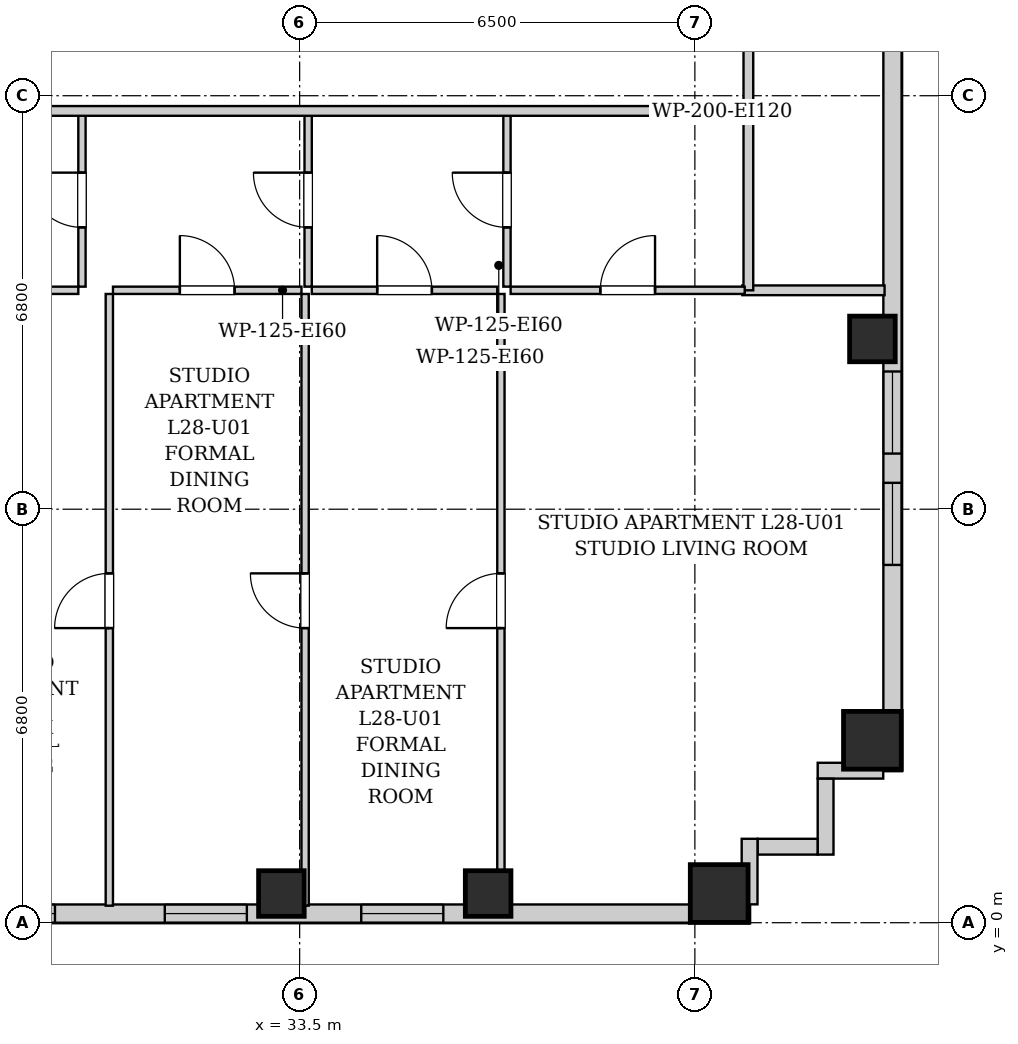
"""IFC4 building model, lengths in metres.
Left out: names, types, materials, properties, quantities, classifications, styles, units other than length and angle.
Written with IfcOpenShell. Run it as: python <this file> out.ifc"""

import sys

from ifc_helpers import new_model, si_unit, direction, frame, frame_2d, origin, origin_2d, place, context, subcontext, project, spatial, rectangle, extrude, element, fill, save


model = new_model("IFC4")
c1 = context("Model", 3, precision=1e-05, world=origin(), true_north=direction((0.0, 1.0)))
c2 = subcontext(c1, "Body", "Model", "MODEL_VIEW")
j1 = project(units=[si_unit("LENGTHUNIT", "METRE"), si_unit("PLANEANGLEUNIT", "RADIAN")], contexts=[c1])
p1 = place(None, origin())
s1 = spatial("IfcSite", under=j1, at=p1, CompositionType="ELEMENT")
p2 = place(p1, origin())
s2 = spatial("IfcBuilding", under=s1, at=p2, CompositionType="ELEMENT")
p3 = place(p2, frame((0.0, 0.0, 100.7)))
s3 = spatial("IfcBuildingStorey", under=s2, at=p3, CompositionType="ELEMENT", Elevation=100.7)
for number, where, z_axis, x_axis in (
    (1, (33.2, 0.48, 0.0), (0.0, 0.0, 1.0), (1.0, 0.0, 0.0)),
    (2, (36.6, 0.48, 0.0), (0.0, 0.0, 1.0), (1.0, 0.0, 0.0)),
):
    element("IfcColumn", number, at=place(p3, frame(where, z_axis=z_axis, x_axis=x_axis)), inside=s3, PredefinedType="COLUMN", context=c2, shape_type="SweptSolid", body=[
        extrude(rectangle(XDim=0.75, YDim=0.75, at=origin_2d()), origin(), (0.0, 0.0, 1.0), 3.2),
    ])
for number, where, z_axis, x_axis in (
    (3, (40.4, 0.48, 0.0), (0.0, 0.0, 1.0), (1.0, 0.0, 0.0)),
    (4, (42.92, 3.0, 0.0), (0.0, 0.0, 1.0), (1.0, 0.0, 0.0)),
):
    element("IfcColumn", number, at=place(p3, frame(where, z_axis=z_axis, x_axis=x_axis)), inside=s3, PredefinedType="COLUMN", context=c2, shape_type="SweptSolid", body=[
        extrude(rectangle(XDim=0.95, YDim=0.95, at=origin_2d()), origin(), (0.0, 0.0, 1.0), 3.2),
    ])
p4 = place(p3, frame((42.92, 9.6, 0.0), z_axis=(0.0, 0.0, 1.0), x_axis=(1.0, 0.0, 0.0)))
e5 = element("IfcColumn", 5, at=p4, inside=s3, PredefinedType="COLUMN", context=c2, shape_type="SweptSolid", body=[
    extrude(rectangle(XDim=0.75, YDim=0.75, at=origin_2d()), origin(), (0.0, 0.0, 1.0), 3.2),
])
p5 = place(p3, frame((43.25, 24.6, 0.0), z_axis=(0.0, 0.0, 1.0), x_axis=(0.0, -1.0, 0.0)))
e6 = element("IfcWall", 6, at=p5, inside=s3, PredefinedType="SOLIDWALL", context=c2, shape_type="SweptSolid", body=[
    extrude(rectangle(XDim=22.1, YDim=0.3, at=frame_2d((11.05, 0.0))), origin(), (0.0, 0.0, 1.0), 2.94),
])
p6 = place(p5, frame((17.366, 0.0, 0.55)))
e7 = element("IfcOpeningElement", 7, at=p6, cuts=e6, PredefinedType="OPENING", context=c2, shape_type="SweptSolid", body=[
    extrude(rectangle(XDim=1.35, YDim=1.2, at=frame_2d((0.675, 0.6))), frame((0.0, 0.16, 0.0), z_axis=(0.0, -1.0, 0.0), x_axis=(1.0, 0.0, 0.0)), (0.0, 0.0, 1.0), 0.32),
])
p7 = place(p5, frame((15.535, 0.0, 0.55)))
e8 = element("IfcOpeningElement", 8, at=p7, cuts=e6, PredefinedType="OPENING", context=c2, shape_type="SweptSolid", body=[
    extrude(rectangle(XDim=1.35, YDim=1.2, at=frame_2d((0.675, 0.6))), frame((0.0, 0.16, 0.0), z_axis=(0.0, -1.0, 0.0), x_axis=(1.0, 0.0, 0.0)), (0.0, 0.0, 1.0), 0.32),
])
p8 = place(p3, frame((40.9, 0.15, 0.0), z_axis=(0.0, 0.0, 1.0), x_axis=(-1.0, 0.0, 0.0)))
e9 = element("IfcWall", 9, at=p8, inside=s3, PredefinedType="SOLIDWALL", context=c2, shape_type="SweptSolid", body=[
    extrude(rectangle(XDim=24.35, YDim=0.3, at=frame_2d((12.175, 0.0))), origin(), (0.0, 0.0, 1.0), 2.94),
])
p9 = place(p8, frame((21.119, 0.0, 0.55)))
e10 = element("IfcOpeningElement", 10, at=p9, cuts=e9, PredefinedType="OPENING", context=c2, shape_type="SweptSolid", body=[
    extrude(rectangle(XDim=1.35, YDim=1.2, at=frame_2d((0.675, 0.6))), frame((0.0, 0.16, 0.0), z_axis=(0.0, -1.0, 0.0), x_axis=(1.0, 0.0, 0.0)), (0.0, 0.0, 1.0), 0.32),
])
p10 = place(p8, frame((18.4, 0.0, 0.55)))
e11 = element("IfcOpeningElement", 11, at=p10, cuts=e9, PredefinedType="OPENING", context=c2, shape_type="SweptSolid", body=[
    extrude(rectangle(XDim=1.35, YDim=1.2, at=frame_2d((0.675, 0.6))), frame((0.0, 0.16, 0.0), z_axis=(0.0, -1.0, 0.0), x_axis=(1.0, 0.0, 0.0)), (0.0, 0.0, 1.0), 0.32),
])
p11 = place(p8, frame((11.424, 0.0, 0.55)))
e12 = element("IfcOpeningElement", 12, at=p11, cuts=e9, PredefinedType="OPENING", context=c2, shape_type="SweptSolid", body=[
    extrude(rectangle(XDim=1.35, YDim=1.2, at=frame_2d((0.675, 0.6))), frame((0.0, 0.16, 0.0), z_axis=(0.0, -1.0, 0.0), x_axis=(1.0, 0.0, 0.0)), (0.0, 0.0, 1.0), 0.32),
])
p12 = place(p8, frame((8.268, 0.0, 0.55)))
e13 = element("IfcOpeningElement", 13, at=p12, cuts=e9, PredefinedType="OPENING", context=c2, shape_type="SweptSolid", body=[
    extrude(rectangle(XDim=1.35, YDim=1.2, at=frame_2d((0.675, 0.6))), frame((0.0, 0.16, 0.0), z_axis=(0.0, -1.0, 0.0), x_axis=(1.0, 0.0, 0.0)), (0.0, 0.0, 1.0), 0.32),
])
p13 = place(p8, frame((5.037, 0.0, 0.55)))
e14 = element("IfcOpeningElement", 14, at=p13, cuts=e9, PredefinedType="OPENING", context=c2, shape_type="SweptSolid", body=[
    extrude(rectangle(XDim=1.35, YDim=1.2, at=frame_2d((0.675, 0.6))), frame((0.0, 0.16, 0.0), z_axis=(0.0, -1.0, 0.0), x_axis=(1.0, 0.0, 0.0)), (0.0, 0.0, 1.0), 0.32),
])
p14 = place(p3, frame((43.098, 2.5, 0.0), z_axis=(0.0, 0.0, 1.0), x_axis=(-1.0, 0.0, 0.0)))
e15 = element("IfcWall", 15, at=p14, inside=s3, PredefinedType="SOLIDWALL", context=c2, shape_type="SweptSolid", body=[
    extrude(rectangle(XDim=1.078, YDim=0.26, at=frame_2d((0.539, 0.0))), origin(), (0.0, 0.0, 1.0), 2.94),
])
p15 = place(p3, frame((42.15, 2.368, 0.0), z_axis=(0.0, 0.0, 1.0), x_axis=(0.0, -1.0, 0.0)))
e16 = element("IfcWall", 16, at=p15, inside=s3, PredefinedType="SOLIDWALL", context=c2, shape_type="SweptSolid", body=[
    extrude(rectangle(XDim=1.248, YDim=0.26, at=frame_2d((0.624, 0.0))), origin(), (0.0, 0.0, 1.0), 2.94),
])
p16 = place(p3, frame((42.018, 1.25, 0.0), z_axis=(0.0, 0.0, 1.0), x_axis=(-1.0, 0.0, 0.0)))
e17 = element("IfcWall", 17, at=p16, inside=s3, PredefinedType="SOLIDWALL", context=c2, shape_type="SweptSolid", body=[
    extrude(rectangle(XDim=0.986, YDim=0.26, at=frame_2d((0.493, 0.0))), origin(), (0.0, 0.0, 1.0), 2.94),
])
p17 = place(p3, frame((40.9, 1.38, 0.0), z_axis=(0.0, 0.0, 1.0), x_axis=(0.0, -1.0, 0.0)))
e18 = element("IfcWall", 18, at=p17, inside=s3, PredefinedType="SOLIDWALL", context=c2, shape_type="SweptSolid", body=[
    extrude(rectangle(XDim=1.078, YDim=0.26, at=frame_2d((0.539, 0.0))), origin(), (0.0, 0.0, 1.0), 2.94),
])
p18 = place(p3, frame((40.88, 13.35, 0.0), z_axis=(0.0, 0.0, 1.0), x_axis=(0.0, 1.0, 0.0)))
e19 = element("IfcWall", 19, at=p18, inside=s3, PredefinedType="PARTITIONING", context=c2, shape_type="SweptSolid", body=[
    extrude(rectangle(XDim=1.74, YDim=0.16, at=frame_2d((0.87, 0.0))), origin(), (0.0, 0.0, 1.0), 2.94),
])
p19 = place(p3, frame((40.78, 10.4, 0.0), z_axis=(0.0, 0.0, 1.0), x_axis=(1.0, 0.0, 0.0)))
e20 = element("IfcWall", 20, at=p19, inside=s3, PredefinedType="PARTITIONING", context=c2, shape_type="SweptSolid", body=[
    extrude(rectangle(XDim=2.34, YDim=0.16, at=frame_2d((1.17, 0.0))), origin(), (0.0, 0.0, 1.0), 2.94),
])
p20 = place(p3, frame((40.88, 10.4, 0.0), z_axis=(0.0, 0.0, 1.0), x_axis=(0.0, 1.0, 0.0)))
e21 = element("IfcWall", 21, at=p20, inside=s3, PredefinedType="PARTITIONING", context=c2, shape_type="SweptSolid", body=[
    extrude(rectangle(XDim=2.91, YDim=0.16, at=frame_2d((1.455, 0.0))), origin(), (0.0, 0.0, 1.0), 2.94),
])
p21 = place(p3, frame((29.92, 10.46, 0.0), z_axis=(0.0, 0.0, 1.0), x_axis=(0.0, 1.0, 0.0)))
e22 = element("IfcWall", 22, at=p21, inside=s3, PredefinedType="PARTITIONING", context=c2, shape_type="SweptSolid", body=[
    extrude(rectangle(XDim=2.85, YDim=0.12, at=frame_2d((1.425, 0.0))), origin(), (0.0, 0.0, 1.0), 2.94),
])
p22 = place(p21, frame((0.975, 0.0, 0.0)))
e23 = element("IfcOpeningElement", 23, at=p22, cuts=e22, PredefinedType="OPENING", context=c2, shape_type="SweptSolid", body=[
    extrude(rectangle(XDim=0.9, YDim=2.05, at=frame_2d((0.45, 1.025))), frame((0.0, 0.07, 0.0), z_axis=(0.0, -1.0, 0.0), x_axis=(1.0, 0.0, 0.0)), (0.0, 0.0, 1.0), 0.14),
])
p23 = place(p3, frame((27.21, 10.4, 0.0), z_axis=(0.0, 0.0, 1.0), x_axis=(1.0, 0.0, 0.0)))
e24 = element("IfcWall", 24, at=p23, inside=s3, PredefinedType="PARTITIONING", context=c2, shape_type="SweptSolid", body=[
    extrude(rectangle(XDim=2.65, YDim=0.12, at=frame_2d((1.325, 0.0))), origin(), (0.0, 0.0, 1.0), 2.94),
])
p24 = place(p23, frame((0.875, 0.0, 0.0)))
e25 = element("IfcOpeningElement", 25, at=p24, cuts=e24, PredefinedType="OPENING", context=c2, shape_type="SweptSolid", body=[
    extrude(rectangle(XDim=0.9, YDim=2.05, at=frame_2d((0.45, 1.025))), frame((0.0, 0.07, 0.0), z_axis=(0.0, -1.0, 0.0), x_axis=(1.0, 0.0, 0.0)), (0.0, 0.0, 1.0), 0.14),
])
p25 = place(p3, frame((33.64, 10.46, 0.0), z_axis=(0.0, 0.0, 1.0), x_axis=(0.0, 1.0, 0.0)))
e26 = element("IfcWall", 26, at=p25, inside=s3, PredefinedType="PARTITIONING", context=c2, shape_type="SweptSolid", body=[
    extrude(rectangle(XDim=2.85, YDim=0.12, at=frame_2d((1.425, 0.0))), origin(), (0.0, 0.0, 1.0), 2.94),
])
p26 = place(p25, frame((0.975, 0.0, 0.0)))
e27 = element("IfcOpeningElement", 27, at=p26, cuts=e26, PredefinedType="OPENING", context=c2, shape_type="SweptSolid", body=[
    extrude(rectangle(XDim=0.9, YDim=2.05, at=frame_2d((0.45, 1.025))), frame((0.0, 0.07, 0.0), z_axis=(0.0, -1.0, 0.0), x_axis=(1.0, 0.0, 0.0)), (0.0, 0.0, 1.0), 0.14),
])
p27 = place(p3, frame((30.43, 10.4, 0.0), z_axis=(0.0, 0.0, 1.0), x_axis=(1.0, 0.0, 0.0)))
e28 = element("IfcWall", 28, at=p27, inside=s3, PredefinedType="PARTITIONING", context=c2, shape_type="SweptSolid", body=[
    extrude(rectangle(XDim=3.1, YDim=0.12, at=frame_2d((1.55, 0.0))), origin(), (0.0, 0.0, 1.0), 2.94),
])
p28 = place(p27, frame((1.1, 0.0, 0.0)))
e29 = element("IfcOpeningElement", 29, at=p28, cuts=e28, PredefinedType="OPENING", context=c2, shape_type="SweptSolid", body=[
    extrude(rectangle(XDim=0.9, YDim=2.05, at=frame_2d((0.45, 1.025))), frame((0.0, 0.07, 0.0), z_axis=(0.0, -1.0, 0.0), x_axis=(1.0, 0.0, 0.0)), (0.0, 0.0, 1.0), 0.14),
])
p29 = place(p3, frame((36.91, 10.46, 0.0), z_axis=(0.0, 0.0, 1.0), x_axis=(0.0, 1.0, 0.0)))
e30 = element("IfcWall", 30, at=p29, inside=s3, PredefinedType="PARTITIONING", context=c2, shape_type="SweptSolid", body=[
    extrude(rectangle(XDim=2.85, YDim=0.12, at=frame_2d((1.425, 0.0))), origin(), (0.0, 0.0, 1.0), 2.94),
])
p30 = place(p29, frame((0.975, 0.0, 0.0)))
e31 = element("IfcOpeningElement", 31, at=p30, cuts=e30, PredefinedType="OPENING", context=c2, shape_type="SweptSolid", body=[
    extrude(rectangle(XDim=0.9, YDim=2.05, at=frame_2d((0.45, 1.025))), frame((0.0, 0.07, 0.0), z_axis=(0.0, -1.0, 0.0), x_axis=(1.0, 0.0, 0.0)), (0.0, 0.0, 1.0), 0.14),
])
p31 = place(p3, frame((33.7, 10.4, 0.0), z_axis=(0.0, 0.0, 1.0), x_axis=(1.0, 0.0, 0.0)))
e32 = element("IfcWall", 32, at=p31, inside=s3, PredefinedType="PARTITIONING", context=c2, shape_type="SweptSolid", body=[
    extrude(rectangle(XDim=3.05, YDim=0.12, at=frame_2d((1.525, 0.0))), origin(), (0.0, 0.0, 1.0), 2.94),
])
p32 = place(p31, frame((1.075, 0.0, 0.0)))
e33 = element("IfcOpeningElement", 33, at=p32, cuts=e32, PredefinedType="OPENING", context=c2, shape_type="SweptSolid", body=[
    extrude(rectangle(XDim=0.9, YDim=2.05, at=frame_2d((0.45, 1.025))), frame((0.0, 0.07, 0.0), z_axis=(0.0, -1.0, 0.0), x_axis=(1.0, 0.0, 0.0)), (0.0, 0.0, 1.0), 0.14),
])
p33 = place(p3, frame((36.97, 10.4, 0.0), z_axis=(0.0, 0.0, 1.0), x_axis=(1.0, 0.0, 0.0)))
e34 = element("IfcWall", 34, at=p33, inside=s3, PredefinedType="PARTITIONING", context=c2, shape_type="SweptSolid", body=[
    extrude(rectangle(XDim=3.85, YDim=0.12, at=frame_2d((1.925, 0.0))), origin(), (0.0, 0.0, 1.0), 2.94),
])
p34 = place(p33, frame((1.475, 0.0, 0.0)))
e35 = element("IfcOpeningElement", 35, at=p34, cuts=e34, PredefinedType="OPENING", context=c2, shape_type="SweptSolid", body=[
    extrude(rectangle(XDim=0.9, YDim=2.05, at=frame_2d((0.45, 1.025))), frame((0.0, 0.07, 0.0), z_axis=(0.0, -1.0, 0.0), x_axis=(1.0, 0.0, 0.0)), (0.0, 0.0, 1.0), 0.14),
])
p35 = place(p3, frame((30.37, 0.28, 0.0), z_axis=(0.0, 0.0, 1.0), x_axis=(0.0, 1.0, 0.0)))
e36 = element("IfcWall", 36, at=p35, inside=s3, PredefinedType="PARTITIONING", context=c2, shape_type="SweptSolid", body=[
    extrude(rectangle(XDim=10.06, YDim=0.12, at=frame_2d((5.03, 0.0))), origin(), (0.0, 0.0, 1.0), 2.94),
])
p36 = place(p35, frame((4.565, 0.0, 0.0)))
e37 = element("IfcOpeningElement", 37, at=p36, cuts=e36, PredefinedType="OPENING", context=c2, shape_type="SweptSolid", body=[
    extrude(rectangle(XDim=0.9, YDim=2.05, at=frame_2d((0.45, 1.025))), frame((0.0, 0.07, 0.0), z_axis=(0.0, -1.0, 0.0), x_axis=(1.0, 0.0, 0.0)), (0.0, 0.0, 1.0), 0.14),
])
p37 = place(p3, frame((33.59, 0.28, 0.0), z_axis=(0.0, 0.0, 1.0), x_axis=(0.0, 1.0, 0.0)))
e38 = element("IfcWall", 38, at=p37, inside=s3, PredefinedType="PARTITIONING", context=c2, shape_type="SweptSolid", body=[
    extrude(rectangle(XDim=10.06, YDim=0.12, at=frame_2d((5.03, 0.0))), origin(), (0.0, 0.0, 1.0), 2.94),
])
p38 = place(p37, frame((4.565, 0.0, 0.0)))
e39 = element("IfcOpeningElement", 39, at=p38, cuts=e38, PredefinedType="OPENING", context=c2, shape_type="SweptSolid", body=[
    extrude(rectangle(XDim=0.9, YDim=2.05, at=frame_2d((0.45, 1.025))), frame((0.0, 0.07, 0.0), z_axis=(0.0, -1.0, 0.0), x_axis=(1.0, 0.0, 0.0)), (0.0, 0.0, 1.0), 0.14),
])
p39 = place(p3, frame((36.81, 0.28, 0.0), z_axis=(0.0, 0.0, 1.0), x_axis=(0.0, 1.0, 0.0)))
e40 = element("IfcWall", 40, at=p39, inside=s3, PredefinedType="PARTITIONING", context=c2, shape_type="SweptSolid", body=[
    extrude(rectangle(XDim=10.06, YDim=0.12, at=frame_2d((5.03, 0.0))), origin(), (0.0, 0.0, 1.0), 2.94),
])
p40 = place(p39, frame((4.565, 0.0, 0.0)))
e41 = element("IfcOpeningElement", 41, at=p40, cuts=e40, PredefinedType="OPENING", context=c2, shape_type="SweptSolid", body=[
    extrude(rectangle(XDim=0.9, YDim=2.05, at=frame_2d((0.45, 1.025))), frame((0.0, 0.07, 0.0), z_axis=(0.0, -1.0, 0.0), x_axis=(1.0, 0.0, 0.0)), (0.0, 0.0, 1.0), 0.14),
])
p41 = place(p3, frame((10.05, 13.35, 0.0), z_axis=(0.0, 0.0, 1.0), x_axis=(1.0, 0.0, 0.0)))
e42 = element("IfcWall", 42, at=p41, inside=s3, PredefinedType="PARTITIONING", context=c2, shape_type="SweptSolid", body=[
    extrude(rectangle(XDim=30.8, YDim=0.16, at=frame_2d((15.4, 0.0))), origin(), (0.0, 0.0, 1.0), 2.94),
])
p42 = place(p41, frame((4.165, 0.0, 0.0)))
e43 = element("IfcOpeningElement", 43, at=p42, cuts=e42, PredefinedType="OPENING", context=c2, shape_type="SweptSolid", body=[
    extrude(rectangle(XDim=0.95, YDim=2.1, at=frame_2d((0.475, 1.05))), frame((0.0, 0.09, 0.0), z_axis=(0.0, -1.0, 0.0), x_axis=(1.0, 0.0, 0.0)), (0.0, 0.0, 1.0), 0.18),
])
p43 = place(p22, origin())
e44 = element("IfcDoor", 44, at=p43, inside=s3, OperationType="SINGLE_SWING_RIGHT", PredefinedType="DOOR", context=c2, shape_type="SweptSolid", body=[
    extrude(rectangle(XDim=0.9, YDim=2.05, at=frame_2d((0.45, 1.025))), frame((0.0, 0.025, 0.0), z_axis=(0.0, -1.0, 0.0), x_axis=(1.0, 0.0, 0.0)), (0.0, 0.0, 1.0), 0.05),
])
fill(e23, e44)
p44 = place(p26, origin())
e45 = element("IfcDoor", 45, at=p44, inside=s3, OperationType="SINGLE_SWING_RIGHT", PredefinedType="DOOR", context=c2, shape_type="SweptSolid", body=[
    extrude(rectangle(XDim=0.9, YDim=2.05, at=frame_2d((0.45, 1.025))), frame((0.0, 0.025, 0.0), z_axis=(0.0, -1.0, 0.0), x_axis=(1.0, 0.0, 0.0)), (0.0, 0.0, 1.0), 0.05),
])
fill(e27, e45)
p45 = place(p28, origin())
e46 = element("IfcDoor", 46, at=p45, inside=s3, OperationType="SINGLE_SWING_LEFT", PredefinedType="DOOR", context=c2, shape_type="SweptSolid", body=[
    extrude(rectangle(XDim=0.9, YDim=2.05, at=frame_2d((0.45, 1.025))), frame((0.0, 0.025, 0.0), z_axis=(0.0, -1.0, 0.0), x_axis=(1.0, 0.0, 0.0)), (0.0, 0.0, 1.0), 0.05),
])
fill(e29, e46)
p46 = place(p30, origin())
e47 = element("IfcDoor", 47, at=p46, inside=s3, OperationType="SINGLE_SWING_RIGHT", PredefinedType="DOOR", context=c2, shape_type="SweptSolid", body=[
    extrude(rectangle(XDim=0.9, YDim=2.05, at=frame_2d((0.45, 1.025))), frame((0.0, 0.025, 0.0), z_axis=(0.0, -1.0, 0.0), x_axis=(1.0, 0.0, 0.0)), (0.0, 0.0, 1.0), 0.05),
])
fill(e31, e47)
p47 = place(p32, origin())
e48 = element("IfcDoor", 48, at=p47, inside=s3, OperationType="SINGLE_SWING_LEFT", PredefinedType="DOOR", context=c2, shape_type="SweptSolid", body=[
    extrude(rectangle(XDim=0.9, YDim=2.05, at=frame_2d((0.45, 1.025))), frame((0.0, 0.025, 0.0), z_axis=(0.0, -1.0, 0.0), x_axis=(1.0, 0.0, 0.0)), (0.0, 0.0, 1.0), 0.05),
])
fill(e33, e48)
p48 = place(p34, origin())
e49 = element("IfcDoor", 49, at=p48, inside=s3, OperationType="SINGLE_SWING_RIGHT", PredefinedType="DOOR", context=c2, shape_type="SweptSolid", body=[
    extrude(rectangle(XDim=0.9, YDim=2.05, at=frame_2d((0.45, 1.025))), frame((0.0, 0.025, 0.0), z_axis=(0.0, -1.0, 0.0), x_axis=(1.0, 0.0, 0.0)), (0.0, 0.0, 1.0), 0.05),
])
fill(e35, e49)
p49 = place(p36, origin())
e50 = element("IfcDoor", 50, at=p49, inside=s3, OperationType="SINGLE_SWING_LEFT", PredefinedType="DOOR", context=c2, shape_type="SweptSolid", body=[
    extrude(rectangle(XDim=0.9, YDim=2.05, at=frame_2d((0.45, 1.025))), frame((0.0, 0.025, 0.0), z_axis=(0.0, -1.0, 0.0), x_axis=(1.0, 0.0, 0.0)), (0.0, 0.0, 1.0), 0.05),
])
fill(e37, e50)
p50 = place(p38, origin())
e51 = element("IfcDoor", 51, at=p50, inside=s3, OperationType="SINGLE_SWING_RIGHT", PredefinedType="DOOR", context=c2, shape_type="SweptSolid", body=[
    extrude(rectangle(XDim=0.9, YDim=2.05, at=frame_2d((0.45, 1.025))), frame((0.0, 0.025, 0.0), z_axis=(0.0, -1.0, 0.0), x_axis=(1.0, 0.0, 0.0)), (0.0, 0.0, 1.0), 0.05),
])
fill(e39, e51)
p51 = place(p40, origin())
e52 = element("IfcDoor", 52, at=p51, inside=s3, OperationType="SINGLE_SWING_LEFT", PredefinedType="DOOR", context=c2, shape_type="SweptSolid", body=[
    extrude(rectangle(XDim=0.9, YDim=2.05, at=frame_2d((0.45, 1.025))), frame((0.0, 0.025, 0.0), z_axis=(0.0, -1.0, 0.0), x_axis=(1.0, 0.0, 0.0)), (0.0, 0.0, 1.0), 0.05),
])
fill(e41, e52)
p52 = place(p11, origin())
e53 = element("IfcWindow", 53, at=p52, inside=s3, PartitioningType="SINGLE_PANEL", PredefinedType="WINDOW", context=c2, shape_type="SweptSolid", body=[
    extrude(rectangle(XDim=1.35, YDim=1.2, at=frame_2d((0.675, 0.6))), frame((0.0, 0.03, 0.0), z_axis=(0.0, -1.0, 0.0), x_axis=(1.0, 0.0, 0.0)), (0.0, 0.0, 1.0), 0.06),
])
fill(e12, e53)
p53 = place(p12, origin())
e54 = element("IfcWindow", 54, at=p53, inside=s3, PartitioningType="SINGLE_PANEL", PredefinedType="WINDOW", context=c2, shape_type="SweptSolid", body=[
    extrude(rectangle(XDim=1.35, YDim=1.2, at=frame_2d((0.675, 0.6))), frame((0.0, 0.03, 0.0), z_axis=(0.0, -1.0, 0.0), x_axis=(1.0, 0.0, 0.0)), (0.0, 0.0, 1.0), 0.06),
])
fill(e13, e54)
p54 = place(p13, origin())
e55 = element("IfcWindow", 55, at=p54, inside=s3, PartitioningType="SINGLE_PANEL", PredefinedType="WINDOW", context=c2, shape_type="SweptSolid", body=[
    extrude(rectangle(XDim=1.35, YDim=1.2, at=frame_2d((0.675, 0.6))), frame((0.0, 0.03, 0.0), z_axis=(0.0, -1.0, 0.0), x_axis=(1.0, 0.0, 0.0)), (0.0, 0.0, 1.0), 0.06),
])
fill(e14, e55)
p55 = place(p6, origin())
e56 = element("IfcWindow", 56, at=p55, inside=s3, PartitioningType="SINGLE_PANEL", PredefinedType="WINDOW", context=c2, shape_type="SweptSolid", body=[
    extrude(rectangle(XDim=1.35, YDim=1.2, at=frame_2d((0.675, 0.6))), frame((0.0, 0.03, 0.0), z_axis=(0.0, -1.0, 0.0), x_axis=(1.0, 0.0, 0.0)), (0.0, 0.0, 1.0), 0.06),
])
fill(e7, e56)
p56 = place(p7, origin())
e57 = element("IfcWindow", 57, at=p56, inside=s3, PartitioningType="SINGLE_PANEL", PredefinedType="WINDOW", context=c2, shape_type="SweptSolid", body=[
    extrude(rectangle(XDim=1.35, YDim=1.2, at=frame_2d((0.675, 0.6))), frame((0.0, 0.03, 0.0), z_axis=(0.0, -1.0, 0.0), x_axis=(1.0, 0.0, 0.0)), (0.0, 0.0, 1.0), 0.06),
])
fill(e8, e57)
save(model, sys.argv[1])
